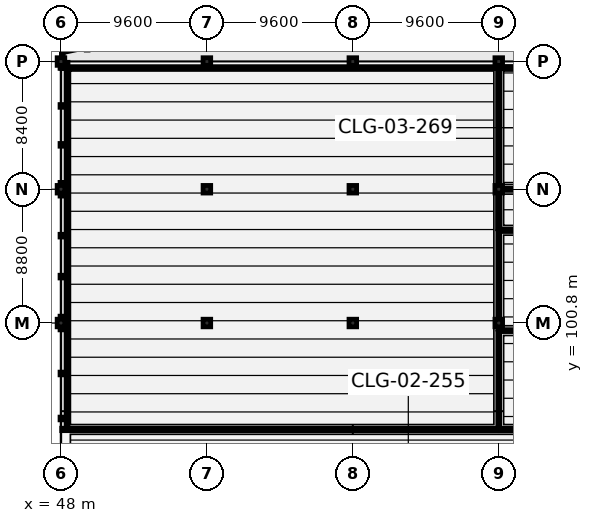
"""IFC4 building model, lengths in metres.
Left out: names, types, materials, properties, quantities, classifications, styles, units other than length and angle.
Written with IfcOpenShell. Run it as: python <this file> out.ifc"""

import sys

from ifc_helpers import new_model, si_unit, direction, frame, frame_2d, origin, origin_2d, place, context, subcontext, project, spatial, rectangle, extrude, element, fill, save


model = new_model("IFC4")
c1 = context("Model", 3, precision=1e-05, world=origin(), true_north=direction((0.0, 1.0)))
c2 = subcontext(c1, "Body", "Model", "MODEL_VIEW")
j1 = project(units=[si_unit("LENGTHUNIT", "METRE"), si_unit("PLANEANGLEUNIT", "RADIAN")], contexts=[c1])
p1 = place(None, origin())
s1 = spatial("IfcSite", under=j1, at=p1, CompositionType="ELEMENT")
p2 = place(p1, origin())
s2 = spatial("IfcBuilding", under=s1, at=p2, CompositionType="ELEMENT")
p3 = place(p2, frame((0.0, 0.0, 14.1)))
s3 = spatial("IfcBuildingStorey", under=s2, at=p3, CompositionType="ELEMENT", Elevation=14.1)
p4 = place(p3, frame((48.0, 100.8, 0.0), z_axis=(0.0, 0.0, 1.0), x_axis=(1.0, 0.0, 0.0)))
e1 = element("IfcColumn", 1, at=p4, inside=s3, PredefinedType="COLUMN", context=c2, shape_type="SweptSolid", body=[
    extrude(rectangle(XDim=0.5, YDim=0.5, at=origin_2d()), origin(), (0.0, 0.0, 1.0), 3.837),
])
p5 = place(p3, frame((48.0, 109.6, 0.0), z_axis=(0.0, 0.0, 1.0), x_axis=(1.0, 0.0, 0.0)))
e2 = element("IfcColumn", 2, at=p5, inside=s3, PredefinedType="COLUMN", context=c2, shape_type="SweptSolid", body=[
    extrude(rectangle(XDim=0.5, YDim=0.5, at=origin_2d()), origin(), (0.0, 0.0, 1.0), 3.674),
])
p6 = place(p3, frame((48.0, 118.0, 0.0), z_axis=(0.0, 0.0, 1.0), x_axis=(1.0, 0.0, 0.0)))
e3 = element("IfcColumn", 3, at=p6, inside=s3, PredefinedType="COLUMN", context=c2, shape_type="SweptSolid", body=[
    extrude(rectangle(XDim=0.5, YDim=0.5, at=origin_2d()), origin(), (0.0, 0.0, 1.0), 3.425),
])
p7 = place(p3, frame((57.6, 100.8, 0.0), z_axis=(0.0, 0.0, 1.0), x_axis=(1.0, 0.0, 0.0)))
e4 = element("IfcColumn", 4, at=p7, inside=s3, PredefinedType="COLUMN", context=c2, shape_type="SweptSolid", body=[
    extrude(rectangle(XDim=0.5, YDim=0.5, at=origin_2d()), origin(), (0.0, 0.0, 1.0), 4.5),
])
p8 = place(p3, frame((57.6, 109.6, 0.0), z_axis=(0.0, 0.0, 1.0), x_axis=(1.0, 0.0, 0.0)))
e5 = element("IfcColumn", 5, at=p8, inside=s3, PredefinedType="COLUMN", context=c2, shape_type="SweptSolid", body=[
    extrude(rectangle(XDim=0.5, YDim=0.5, at=origin_2d()), origin(), (0.0, 0.0, 1.0), 4.403),
])
p9 = place(p3, frame((57.6, 118.0, 0.0), z_axis=(0.0, 0.0, 1.0), x_axis=(1.0, 0.0, 0.0)))
e6 = element("IfcColumn", 6, at=p9, inside=s3, PredefinedType="COLUMN", context=c2, shape_type="SweptSolid", body=[
    extrude(rectangle(XDim=0.5, YDim=0.5, at=origin_2d()), origin(), (0.0, 0.0, 1.0), 3.705),
])
for number, where, z_axis, x_axis in (
    (7, (67.2, 100.8, 0.0), (0.0, 0.0, 1.0), (1.0, 0.0, 0.0)),
    (8, (67.2, 109.6, 0.0), (0.0, 0.0, 1.0), (1.0, 0.0, 0.0)),
):
    element("IfcColumn", number, at=place(p3, frame(where, z_axis=z_axis, x_axis=x_axis)), inside=s3, PredefinedType="COLUMN", context=c2, shape_type="SweptSolid", body=[
        extrude(rectangle(XDim=0.5, YDim=0.5, at=origin_2d()), origin(), (0.0, 0.0, 1.0), 4.5),
    ])
p10 = place(p3, frame((67.2, 118.0, 0.0), z_axis=(0.0, 0.0, 1.0), x_axis=(1.0, 0.0, 0.0)))
e9 = element("IfcColumn", 9, at=p10, inside=s3, PredefinedType="COLUMN", context=c2, shape_type="SweptSolid", body=[
    extrude(rectangle(XDim=0.5, YDim=0.5, at=origin_2d()), origin(), (0.0, 0.0, 1.0), 3.861),
])
for number, where, z_axis, x_axis in (
    (10, (76.8, 100.8, 0.0), (0.0, 0.0, 1.0), (1.0, 0.0, 0.0)),
    (11, (76.8, 109.6, 0.0), (0.0, 0.0, 1.0), (1.0, 0.0, 0.0)),
):
    element("IfcColumn", number, at=place(p3, frame(where, z_axis=z_axis, x_axis=x_axis)), inside=s3, PredefinedType="COLUMN", context=c2, shape_type="SweptSolid", body=[
        extrude(rectangle(XDim=0.5, YDim=0.5, at=origin_2d()), origin(), (0.0, 0.0, 1.0), 4.5),
    ])
p11 = place(p3, frame((76.8, 118.0, 0.0), z_axis=(0.0, 0.0, 1.0), x_axis=(1.0, 0.0, 0.0)))
e12 = element("IfcColumn", 12, at=p11, inside=s3, PredefinedType="COLUMN", context=c2, shape_type="SweptSolid", body=[
    extrude(rectangle(XDim=0.5, YDim=0.5, at=origin_2d()), origin(), (0.0, 0.0, 1.0), 3.851),
])
p12 = place(p3, frame((48.05, 93.8, 0.0), z_axis=(0.0, 0.0, 1.0), x_axis=(1.0, 0.0, 0.0)))
e13 = element("IfcWall", 13, at=p12, inside=s3, PredefinedType="PARTITIONING", context=c2, shape_type="SweptSolid", body=[
    extrude(rectangle(XDim=28.65, YDim=0.16, at=frame_2d((14.325, 0.0))), origin(), (0.0, 0.0, 1.0), 3.1),
])
p13 = place(p12, frame((13.85, 0.0, 0.0)))
e14 = element("IfcOpeningElement", 14, at=p13, cuts=e13, PredefinedType="OPENING", context=c2, shape_type="SweptSolid", body=[
    extrude(rectangle(XDim=0.95, YDim=2.15, at=frame_2d((0.475, 1.075))), frame((0.0, 0.09, 0.0), z_axis=(0.0, -1.0, 0.0), x_axis=(1.0, 0.0, 0.0)), (0.0, 0.0, 1.0), 0.18),
])
p14 = place(p3, frame((76.9, 93.8, 0.0), z_axis=(0.0, 0.0, 1.0), x_axis=(1.0, 0.0, 0.0)))
e15 = element("IfcWall", 15, at=p14, inside=s3, PredefinedType="PARTITIONING", context=c2, shape_type="SweptSolid", body=[
    extrude(rectangle(XDim=9.4, YDim=0.16, at=frame_2d((4.7, 0.0))), origin(), (0.0, 0.0, 1.0), 3.1),
])
p15 = place(p14, frame((4.18, 0.0, 0.0)))
e16 = element("IfcOpeningElement", 16, at=p15, cuts=e15, PredefinedType="OPENING", context=c2, shape_type="SweptSolid", body=[
    extrude(rectangle(XDim=1.04, YDim=2.18, at=frame_2d((0.52, 1.09))), frame((0.0, 0.09, 0.0), z_axis=(0.0, -1.0, 0.0), x_axis=(1.0, 0.0, 0.0)), (0.0, 0.0, 1.0), 0.18),
])
p16 = place(p3, frame((76.8, 100.4, 0.0), z_axis=(0.0, 0.0, 1.0), x_axis=(0.0, 1.0, 0.0)))
e17 = element("IfcWall", 17, at=p16, inside=s3, PredefinedType="PARTITIONING", context=c2, shape_type="SweptSolid", body=[
    extrude(rectangle(XDim=6.4, YDim=0.125, at=frame_2d((3.2, 0.0))), origin(), (0.0, 0.0, 1.0), 3.1),
])
p17 = place(p3, frame((76.8, 107.0, 0.0), z_axis=(0.0, 0.0, 1.0), x_axis=(0.0, 1.0, 0.0)))
e18 = element("IfcWall", 18, at=p17, inside=s3, PredefinedType="PARTITIONING", context=c2, shape_type="SweptSolid", body=[
    extrude(rectangle(XDim=2.5, YDim=0.16, at=frame_2d((1.25, 0.0))), origin(), (0.0, 0.0, 1.0), 3.1),
])
p18 = place(p17, frame((0.443, 0.0, 0.0)))
e19 = element("IfcOpeningElement", 19, at=p18, cuts=e18, PredefinedType="OPENING", context=c2, shape_type="SweptSolid", body=[
    extrude(rectangle(XDim=0.95, YDim=2.15, at=frame_2d((0.475, 1.075))), frame((0.0, 0.09, 0.0), z_axis=(0.0, -1.0, 0.0), x_axis=(1.0, 0.0, 0.0)), (0.0, 0.0, 1.0), 0.18),
])
p19 = place(p3, frame((76.8, 109.7, 0.0), z_axis=(0.0, 0.0, 1.0), x_axis=(0.0, 1.0, 0.0)))
e20 = element("IfcWall", 20, at=p19, inside=s3, PredefinedType="PARTITIONING", context=c2, shape_type="SweptSolid", body=[
    extrude(rectangle(XDim=8.25, YDim=0.15, at=frame_2d((4.125, 0.0))), origin(), (0.0, 0.0, 1.0), 2.992),
])
p20 = place(p3, frame((76.8, 93.9, 0.0), z_axis=(0.0, 0.0, 1.0), x_axis=(0.0, 1.0, 0.0)))
e21 = element("IfcWall", 21, at=p20, inside=s3, PredefinedType="PARTITIONING", context=c2, shape_type="SweptSolid", body=[
    extrude(rectangle(XDim=6.3, YDim=0.125, at=frame_2d((3.15, 0.0))), origin(), (0.0, 0.0, 1.0), 3.1),
])
p21 = place(p3, frame((76.9, 106.9, 0.0), z_axis=(0.0, 0.0, 1.0), x_axis=(1.0, 0.0, 0.0)))
e22 = element("IfcWall", 22, at=p21, inside=s3, PredefinedType="PARTITIONING", context=c2, shape_type="SweptSolid", body=[
    extrude(rectangle(XDim=9.4, YDim=0.16, at=frame_2d((4.7, 0.0))), origin(), (0.0, 0.0, 1.0), 3.1),
])
p22 = place(p21, frame((4.18, 0.0, 0.0)))
e23 = element("IfcOpeningElement", 23, at=p22, cuts=e22, PredefinedType="OPENING", context=c2, shape_type="SweptSolid", body=[
    extrude(rectangle(XDim=1.04, YDim=2.18, at=frame_2d((0.52, 1.09))), frame((0.0, 0.09, 0.0), z_axis=(0.0, -1.0, 0.0), x_axis=(1.0, 0.0, 0.0)), (0.0, 0.0, 1.0), 0.18),
])
p23 = place(p3, frame((76.9, 100.3, 0.0), z_axis=(0.0, 0.0, 1.0), x_axis=(1.0, 0.0, 0.0)))
e24 = element("IfcWall", 24, at=p23, inside=s3, PredefinedType="PARTITIONING", context=c2, shape_type="SweptSolid", body=[
    extrude(rectangle(XDim=9.4, YDim=0.125, at=frame_2d((4.7, 0.0))), origin(), (0.0, 0.0, 1.0), 3.1),
])
p24 = place(p3, frame((76.9, 109.6, 0.0), z_axis=(0.0, 0.0, 1.0), x_axis=(1.0, 0.0, 0.0)))
e25 = element("IfcWall", 25, at=p24, inside=s3, PredefinedType="PARTITIONING", context=c2, shape_type="SweptSolid", body=[
    extrude(rectangle(XDim=2.7, YDim=0.15, at=frame_2d((1.35, 0.0))), origin(), (0.0, 0.0, 1.0), 3.1),
])
p25 = place(p24, frame((1.132, 0.0, 0.0)))
e26 = element("IfcOpeningElement", 26, at=p25, cuts=e25, PredefinedType="OPENING", context=c2, shape_type="SweptSolid", body=[
    extrude(rectangle(XDim=0.95, YDim=2.15, at=frame_2d((0.475, 1.075))), frame((0.0, 0.085, 0.0), z_axis=(0.0, -1.0, 0.0), x_axis=(1.0, 0.0, 0.0)), (0.0, 0.0, 1.0), 0.17),
])
p26 = place(p3, frame((48.05, 117.6, 0.0), z_axis=(0.0, 0.0, 1.0), x_axis=(1.0, 0.0, 0.0)))
e27 = element("IfcWall", 27, at=p26, inside=s3, PredefinedType="PARTITIONING", context=c2, shape_type="SweptSolid", body=[
    extrude(rectangle(XDim=28.51, YDim=0.125, at=frame_2d((14.255, 0.0))), origin(), (0.0, 0.0, 1.0), 3.1),
])
p27 = place(p3, frame((48.4, 94.04, 0.0), z_axis=(0.0, 0.0, 1.0), x_axis=(0.0, 1.0, 0.0)))
e28 = element("IfcWall", 28, at=p27, inside=s3, PredefinedType="PARTITIONING", context=c2, shape_type="SweptSolid", body=[
    extrude(rectangle(XDim=23.91, YDim=0.125, at=frame_2d((11.955, 0.0))), origin(), (0.0, 0.0, 1.0), 3.1),
])
p28 = place(p3, frame((77.04, 117.6, 0.0), z_axis=(0.0, 0.0, 1.0), x_axis=(1.0, 0.0, 0.0)))
e29 = element("IfcWall", 29, at=p28, inside=s3, PredefinedType="PARTITIONING", context=c2, shape_type="SweptSolid", body=[
    extrude(rectangle(XDim=2.42, YDim=0.15, at=frame_2d((1.21, 0.0))), origin(), (0.0, 0.0, 1.0), 3.1),
])
p29 = place(p13, origin())
e30 = element("IfcDoor", 30, at=p29, inside=s3, OperationType="SINGLE_SWING_RIGHT", PredefinedType="DOOR", context=c2, shape_type="SweptSolid", body=[
    extrude(rectangle(XDim=0.95, YDim=2.15, at=frame_2d((0.475, 1.075))), frame((0.0, 0.025, 0.0), z_axis=(0.0, -1.0, 0.0), x_axis=(1.0, 0.0, 0.0)), (0.0, 0.0, 1.0), 0.05),
])
fill(e14, e30)
p30 = place(p18, origin())
e31 = element("IfcDoor", 31, at=p30, inside=s3, OperationType="SINGLE_SWING_RIGHT", PredefinedType="DOOR", context=c2, shape_type="SweptSolid", body=[
    extrude(rectangle(XDim=0.95, YDim=2.15, at=frame_2d((0.475, 1.075))), frame((0.0, 0.025, 0.0), z_axis=(0.0, -1.0, 0.0), x_axis=(1.0, 0.0, 0.0)), (0.0, 0.0, 1.0), 0.05),
])
fill(e19, e31)
save(model, sys.argv[1])
